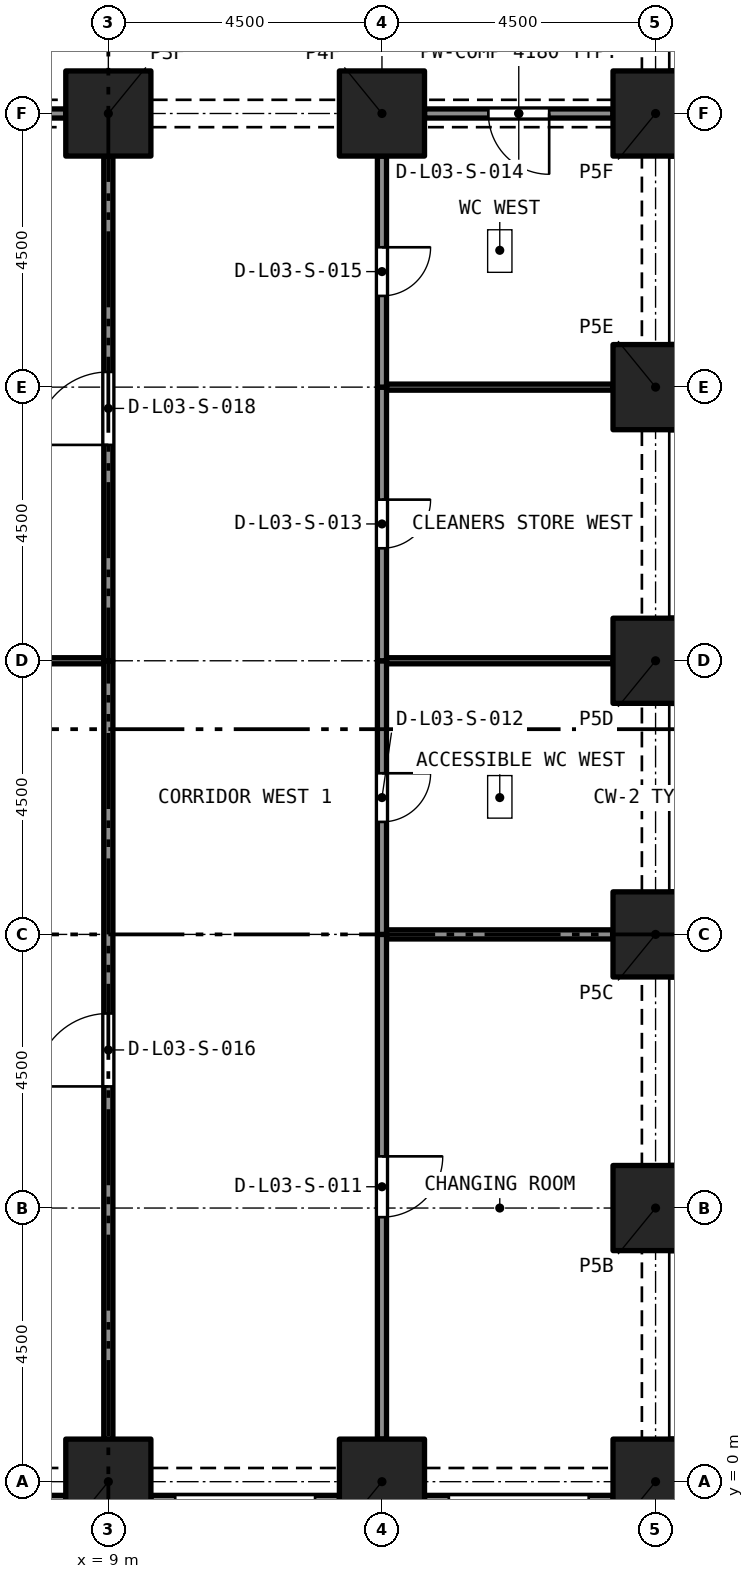
"""IFC4 building model, lengths in metres.
Left out: names, types, materials, properties, quantities, classifications, styles, units other than length and angle.
Written with IfcOpenShell. Run it as: python <this file> out.ifc"""

import sys

from ifc_helpers import new_model, si_unit, direction, frame, frame_2d, origin, origin_2d, place, context, subcontext, project, spatial, rectangle, extrude, element, fill, save


model = new_model("IFC4")
c1 = context("Model", 3, precision=1e-05, world=origin(), true_north=direction((0.0, 1.0)))
c2 = subcontext(c1, "Body", "Model", "MODEL_VIEW")
j1 = project(units=[si_unit("LENGTHUNIT", "METRE"), si_unit("PLANEANGLEUNIT", "RADIAN")], contexts=[c1])
p1 = place(None, origin())
s1 = spatial("IfcSite", under=j1, at=p1, CompositionType="ELEMENT")
p2 = place(p1, origin())
s2 = spatial("IfcBuilding", under=s1, at=p2, CompositionType="ELEMENT")
p3 = place(p2, frame((0.0, 0.0, 16.0)))
s3 = spatial("IfcBuildingStorey", under=s2, at=p3, CompositionType="ELEMENT", Elevation=16.0)
for number, where, z_axis, x_axis in (
    (1, (9.0, 0.0, 0.0), (0.0, 0.0, 1.0), (1.0, 0.0, 0.0)),
    (2, (13.5, 0.0, 0.0), (0.0, 0.0, 1.0), (1.0, 0.0, 0.0)),
    (3, (18.0, 0.0, 0.0), (0.0, 0.0, 1.0), (1.0, 0.0, 0.0)),
    (4, (18.0, 4.5, 0.0), (0.0, 0.0, 1.0), (1.0, 0.0, 0.0)),
    (5, (18.0, 9.0, 0.0), (0.0, 0.0, 1.0), (1.0, 0.0, 0.0)),
    (6, (18.0, 13.5, 0.0), (0.0, 0.0, 1.0), (1.0, 0.0, 0.0)),
    (7, (18.0, 18.0, 0.0), (0.0, 0.0, 1.0), (1.0, 0.0, 0.0)),
    (8, (9.0, 22.5, 0.0), (0.0, 0.0, 1.0), (1.0, 0.0, 0.0)),
    (9, (13.5, 22.5, 0.0), (0.0, 0.0, 1.0), (1.0, 0.0, 0.0)),
    (10, (18.0, 22.5, 0.0), (0.0, 0.0, 1.0), (1.0, 0.0, 0.0)),
):
    element("IfcColumn", number, at=place(p3, frame(where, z_axis=z_axis, x_axis=x_axis)), inside=s3, PredefinedType="COLUMN", context=c2, shape_type="SweptSolid", body=[
        extrude(rectangle(XDim=1.4, YDim=1.4, at=origin_2d()), origin(), (0.0, 0.0, 1.0), 5.0),
    ])
p4 = place(p3, frame((8.3, -0.375, 0.0), z_axis=(0.0, 0.0, 1.0), x_axis=(-1.0, 0.0, 0.0)))
e11 = element("IfcWall", 11, at=p4, inside=s3, PredefinedType="SOLIDWALL", context=c2, shape_type="SweptSolid", body=[
    extrude(rectangle(XDim=3.1, YDim=0.3, at=frame_2d((1.55, 0.0))), origin(), (0.0, 0.0, 1.0), 5.0),
])
p5 = place(p4, frame((0.4, 0.0, 0.45)))
e12 = element("IfcOpeningElement", 12, at=p5, cuts=e11, PredefinedType="OPENING", context=c2, shape_type="SweptSolid", body=[
    extrude(rectangle(XDim=2.3, YDim=3.3, at=frame_2d((1.15, 1.65))), frame((0.0, 0.16, 0.0), z_axis=(0.0, -1.0, 0.0), x_axis=(1.0, 0.0, 0.0)), (0.0, 0.0, 1.0), 0.32),
])
p6 = place(p3, frame((12.8, -0.375, 0.0), z_axis=(0.0, 0.0, 1.0), x_axis=(-1.0, 0.0, 0.0)))
e13 = element("IfcWall", 13, at=p6, inside=s3, PredefinedType="SOLIDWALL", context=c2, shape_type="SweptSolid", body=[
    extrude(rectangle(XDim=3.1, YDim=0.3, at=frame_2d((1.55, 0.0))), origin(), (0.0, 0.0, 1.0), 5.0),
])
p7 = place(p6, frame((0.4, 0.0, 0.45)))
e14 = element("IfcOpeningElement", 14, at=p7, cuts=e13, PredefinedType="OPENING", context=c2, shape_type="SweptSolid", body=[
    extrude(rectangle(XDim=2.3, YDim=3.3, at=frame_2d((1.15, 1.65))), frame((0.0, 0.16, 0.0), z_axis=(0.0, -1.0, 0.0), x_axis=(1.0, 0.0, 0.0)), (0.0, 0.0, 1.0), 0.32),
])
p8 = place(p3, frame((17.3, -0.375, 0.0), z_axis=(0.0, 0.0, 1.0), x_axis=(-1.0, 0.0, 0.0)))
e15 = element("IfcWall", 15, at=p8, inside=s3, PredefinedType="SOLIDWALL", context=c2, shape_type="SweptSolid", body=[
    extrude(rectangle(XDim=3.1, YDim=0.3, at=frame_2d((1.55, 0.0))), origin(), (0.0, 0.0, 1.0), 5.0),
])
p9 = place(p8, frame((0.4, 0.0, 0.45)))
e16 = element("IfcOpeningElement", 16, at=p9, cuts=e15, PredefinedType="OPENING", context=c2, shape_type="SweptSolid", body=[
    extrude(rectangle(XDim=2.3, YDim=3.3, at=frame_2d((1.15, 1.65))), frame((0.0, 0.16, 0.0), z_axis=(0.0, -1.0, 0.0), x_axis=(1.0, 0.0, 0.0)), (0.0, 0.0, 1.0), 0.32),
])
p10 = place(p3, frame((13.575, 9.0, 0.0), z_axis=(0.0, 0.0, 1.0), x_axis=(1.0, 0.0, 0.0)))
e17 = element("IfcWall", 17, at=p10, inside=s3, PredefinedType="PARTITIONING", context=c2, shape_type="SweptSolid", body=[
    extrude(rectangle(XDim=3.725, YDim=0.15, at=frame_2d((1.863, 0.0))), origin(), (0.0, 0.0, 1.0), 4.65),
])
p11 = place(p3, frame((13.5, 9.0, 0.0), z_axis=(0.0, 0.0, 1.0), x_axis=(0.0, -1.0, 0.0)))
e18 = element("IfcWall", 18, at=p11, inside=s3, PredefinedType="PARTITIONING", context=c2, shape_type="SweptSolid", body=[
    extrude(rectangle(XDim=8.3, YDim=0.15, at=frame_2d((4.15, 0.0))), origin(), (0.0, 0.0, 1.0), 4.65),
])
p12 = place(p11, frame((3.65, 0.0, 0.0)))
e19 = element("IfcOpeningElement", 19, at=p12, cuts=e18, PredefinedType="OPENING", context=c2, shape_type="SweptSolid", body=[
    extrude(rectangle(XDim=1.0, YDim=2.1, at=frame_2d((0.5, 1.05))), frame((0.0, 0.085, 0.0), z_axis=(0.0, -1.0, 0.0), x_axis=(1.0, 0.0, 0.0)), (0.0, 0.0, 1.0), 0.17),
])
p13 = place(p3, frame((13.575, 13.5, 0.0), z_axis=(0.0, 0.0, 1.0), x_axis=(1.0, 0.0, 0.0)))
e20 = element("IfcWall", 20, at=p13, inside=s3, PredefinedType="PARTITIONING", context=c2, shape_type="SweptSolid", body=[
    extrude(rectangle(XDim=3.725, YDim=0.1, at=frame_2d((1.863, 0.0))), origin(), (0.0, 0.0, 1.0), 4.65),
])
p14 = place(p3, frame((13.5, 13.5, 0.0), z_axis=(0.0, 0.0, 1.0), x_axis=(0.0, -1.0, 0.0)))
e21 = element("IfcWall", 21, at=p14, inside=s3, PredefinedType="PARTITIONING", context=c2, shape_type="SweptSolid", body=[
    extrude(rectangle(XDim=4.5, YDim=0.15, at=frame_2d((2.25, 0.0))), origin(), (0.0, 0.0, 1.0), 4.65),
])
p15 = place(p14, frame((1.85, 0.0, 0.0)))
e22 = element("IfcOpeningElement", 22, at=p15, cuts=e21, PredefinedType="OPENING", context=c2, shape_type="SweptSolid", body=[
    extrude(rectangle(XDim=0.8, YDim=2.1, at=frame_2d((0.4, 1.05))), frame((0.0, 0.085, 0.0), z_axis=(0.0, -1.0, 0.0), x_axis=(1.0, 0.0, 0.0)), (0.0, 0.0, 1.0), 0.17),
])
p16 = place(p3, frame((13.575, 18.0, 0.0), z_axis=(0.0, 0.0, 1.0), x_axis=(1.0, 0.0, 0.0)))
e23 = element("IfcWall", 23, at=p16, inside=s3, PredefinedType="PARTITIONING", context=c2, shape_type="SweptSolid", body=[
    extrude(rectangle(XDim=3.725, YDim=0.1, at=frame_2d((1.863, 0.0))), origin(), (0.0, 0.0, 1.0), 4.65),
])
p17 = place(p3, frame((13.5, 18.0, 0.0), z_axis=(0.0, 0.0, 1.0), x_axis=(0.0, -1.0, 0.0)))
e24 = element("IfcWall", 24, at=p17, inside=s3, PredefinedType="PARTITIONING", context=c2, shape_type="SweptSolid", body=[
    extrude(rectangle(XDim=4.5, YDim=0.15, at=frame_2d((2.25, 0.0))), origin(), (0.0, 0.0, 1.0), 4.65),
])
p18 = place(p17, frame((1.85, 0.0, 0.0)))
e25 = element("IfcOpeningElement", 25, at=p18, cuts=e24, PredefinedType="OPENING", context=c2, shape_type="SweptSolid", body=[
    extrude(rectangle(XDim=0.8, YDim=2.1, at=frame_2d((0.4, 1.05))), frame((0.0, 0.085, 0.0), z_axis=(0.0, -1.0, 0.0), x_axis=(1.0, 0.0, 0.0)), (0.0, 0.0, 1.0), 0.17),
])
p19 = place(p3, frame((17.3, 22.5, 0.0), z_axis=(0.0, 0.0, 1.0), x_axis=(-1.0, 0.0, 0.0)))
e26 = element("IfcWall", 26, at=p19, inside=s3, PredefinedType="PARTITIONING", context=c2, shape_type="SweptSolid", body=[
    extrude(rectangle(XDim=3.1, YDim=0.15, at=frame_2d((1.55, 0.0))), origin(), (0.0, 0.0, 1.0), 4.18),
])
p20 = place(p19, frame((1.05, 0.0, 0.0)))
e27 = element("IfcOpeningElement", 27, at=p20, cuts=e26, PredefinedType="OPENING", context=c2, shape_type="SweptSolid", body=[
    extrude(rectangle(XDim=1.0, YDim=2.1, at=frame_2d((0.5, 1.05))), frame((0.0, 0.085, 0.0), z_axis=(0.0, -1.0, 0.0), x_axis=(1.0, 0.0, 0.0)), (0.0, 0.0, 1.0), 0.17),
])
p21 = place(p3, frame((13.5, 21.8, 0.0), z_axis=(0.0, 0.0, 1.0), x_axis=(0.0, -1.0, 0.0)))
e28 = element("IfcWall", 28, at=p21, inside=s3, PredefinedType="PARTITIONING", context=c2, shape_type="SweptSolid", body=[
    extrude(rectangle(XDim=3.8, YDim=0.15, at=frame_2d((1.9, 0.0))), origin(), (0.0, 0.0, 1.0), 4.65),
])
p22 = place(p21, frame((1.5, 0.0, 0.0)))
e29 = element("IfcOpeningElement", 29, at=p22, cuts=e28, PredefinedType="OPENING", context=c2, shape_type="SweptSolid", body=[
    extrude(rectangle(XDim=0.8, YDim=2.1, at=frame_2d((0.4, 1.05))), frame((0.0, 0.085, 0.0), z_axis=(0.0, -1.0, 0.0), x_axis=(1.0, 0.0, 0.0)), (0.0, 0.0, 1.0), 0.17),
])
p23 = place(p3, frame((0.7, 13.5, 0.0), z_axis=(0.0, 0.0, 1.0), x_axis=(1.0, 0.0, 0.0)))
e30 = element("IfcWall", 30, at=p23, inside=s3, PredefinedType="PARTITIONING", context=c2, shape_type="SweptSolid", body=[
    extrude(rectangle(XDim=8.225, YDim=0.1, at=frame_2d((4.113, 0.0))), origin(), (0.0, 0.0, 1.0), 4.65),
])
p24 = place(p3, frame((9.0, 0.7, 0.0), z_axis=(0.0, 0.0, 1.0), x_axis=(0.0, 1.0, 0.0)))
e31 = element("IfcWall", 31, at=p24, inside=s3, PredefinedType="PARTITIONING", context=c2, shape_type="SweptSolid", body=[
    extrude(rectangle(XDim=12.8, YDim=0.15, at=frame_2d((6.4, 0.0))), origin(), (0.0, 0.0, 1.0), 4.65),
])
p25 = place(p24, frame((5.8, 0.0, 0.0)))
e32 = element("IfcOpeningElement", 32, at=p25, cuts=e31, PredefinedType="OPENING", context=c2, shape_type="SweptSolid", body=[
    extrude(rectangle(XDim=1.2, YDim=2.1, at=frame_2d((0.6, 1.05))), frame((0.0, 0.085, 0.0), z_axis=(0.0, -1.0, 0.0), x_axis=(1.0, 0.0, 0.0)), (0.0, 0.0, 1.0), 0.17),
])
p26 = place(p3, frame((5.2, 22.5, 0.0), z_axis=(0.0, 0.0, 1.0), x_axis=(1.0, 0.0, 0.0)))
e33 = element("IfcWall", 33, at=p26, inside=s3, PredefinedType="PARTITIONING", context=c2, shape_type="SweptSolid", body=[
    extrude(rectangle(XDim=3.1, YDim=0.15, at=frame_2d((1.55, 0.0))), origin(), (0.0, 0.0, 1.0), 4.18),
])
p27 = place(p3, frame((9.0, 13.5, 0.0), z_axis=(0.0, 0.0, 1.0), x_axis=(0.0, 1.0, 0.0)))
e34 = element("IfcWall", 34, at=p27, inside=s3, PredefinedType="PARTITIONING", context=c2, shape_type="SweptSolid", body=[
    extrude(rectangle(XDim=8.3, YDim=0.15, at=frame_2d((4.15, 0.0))), origin(), (0.0, 0.0, 1.0), 4.65),
])
p28 = place(p27, frame((3.55, 0.0, 0.0)))
e35 = element("IfcOpeningElement", 35, at=p28, cuts=e34, PredefinedType="OPENING", context=c2, shape_type="SweptSolid", body=[
    extrude(rectangle(XDim=1.2, YDim=2.1, at=frame_2d((0.6, 1.05))), frame((0.0, 0.085, 0.0), z_axis=(0.0, -1.0, 0.0), x_axis=(1.0, 0.0, 0.0)), (0.0, 0.0, 1.0), 0.17),
])
p29 = place(p12, origin())
e36 = element("IfcDoor", 36, at=p29, inside=s3, OperationType="SINGLE_SWING_RIGHT", PredefinedType="DOOR", context=c2, shape_type="SweptSolid", body=[
    extrude(rectangle(XDim=1.0, YDim=2.1, at=frame_2d((0.5, 1.05))), frame((0.0, 0.025, 0.0), z_axis=(0.0, -1.0, 0.0), x_axis=(1.0, 0.0, 0.0)), (0.0, 0.0, 1.0), 0.05),
])
fill(e19, e36)
p30 = place(p15, origin())
e37 = element("IfcDoor", 37, at=p30, inside=s3, OperationType="SINGLE_SWING_RIGHT", PredefinedType="DOOR", context=c2, shape_type="SweptSolid", body=[
    extrude(rectangle(XDim=0.8, YDim=2.1, at=frame_2d((0.4, 1.05))), frame((0.0, 0.025, 0.0), z_axis=(0.0, -1.0, 0.0), x_axis=(1.0, 0.0, 0.0)), (0.0, 0.0, 1.0), 0.05),
])
fill(e22, e37)
p31 = place(p18, origin())
e38 = element("IfcDoor", 38, at=p31, inside=s3, OperationType="SINGLE_SWING_RIGHT", PredefinedType="DOOR", context=c2, shape_type="SweptSolid", body=[
    extrude(rectangle(XDim=0.8, YDim=2.1, at=frame_2d((0.4, 1.05))), frame((0.0, 0.025, 0.0), z_axis=(0.0, -1.0, 0.0), x_axis=(1.0, 0.0, 0.0)), (0.0, 0.0, 1.0), 0.05),
])
fill(e25, e38)
p32 = place(p20, origin())
e39 = element("IfcDoor", 39, at=p32, inside=s3, OperationType="SINGLE_SWING_RIGHT", PredefinedType="DOOR", context=c2, shape_type="SweptSolid", body=[
    extrude(rectangle(XDim=1.0, YDim=2.1, at=frame_2d((0.5, 1.05))), frame((0.0, 0.025, 0.0), z_axis=(0.0, -1.0, 0.0), x_axis=(1.0, 0.0, 0.0)), (0.0, 0.0, 1.0), 0.05),
])
fill(e27, e39)
p33 = place(p22, origin())
e40 = element("IfcDoor", 40, at=p33, inside=s3, OperationType="SINGLE_SWING_RIGHT", PredefinedType="DOOR", context=c2, shape_type="SweptSolid", body=[
    extrude(rectangle(XDim=0.8, YDim=2.1, at=frame_2d((0.4, 1.05))), frame((0.0, 0.025, 0.0), z_axis=(0.0, -1.0, 0.0), x_axis=(1.0, 0.0, 0.0)), (0.0, 0.0, 1.0), 0.05),
])
fill(e29, e40)
p34 = place(p25, origin())
e41 = element("IfcDoor", 41, at=p34, inside=s3, OperationType="SINGLE_SWING_RIGHT", PredefinedType="DOOR", context=c2, shape_type="SweptSolid", body=[
    extrude(rectangle(XDim=1.2, YDim=2.1, at=frame_2d((0.6, 1.05))), frame((0.0, 0.025, 0.0), z_axis=(0.0, -1.0, 0.0), x_axis=(1.0, 0.0, 0.0)), (0.0, 0.0, 1.0), 0.05),
])
fill(e32, e41)
p35 = place(p28, origin())
e42 = element("IfcDoor", 42, at=p35, inside=s3, OperationType="SINGLE_SWING_RIGHT", PredefinedType="DOOR", context=c2, shape_type="SweptSolid", body=[
    extrude(rectangle(XDim=1.2, YDim=2.1, at=frame_2d((0.6, 1.05))), frame((0.0, 0.025, 0.0), z_axis=(0.0, -1.0, 0.0), x_axis=(1.0, 0.0, 0.0)), (0.0, 0.0, 1.0), 0.05),
])
fill(e35, e42)
save(model, sys.argv[1])
